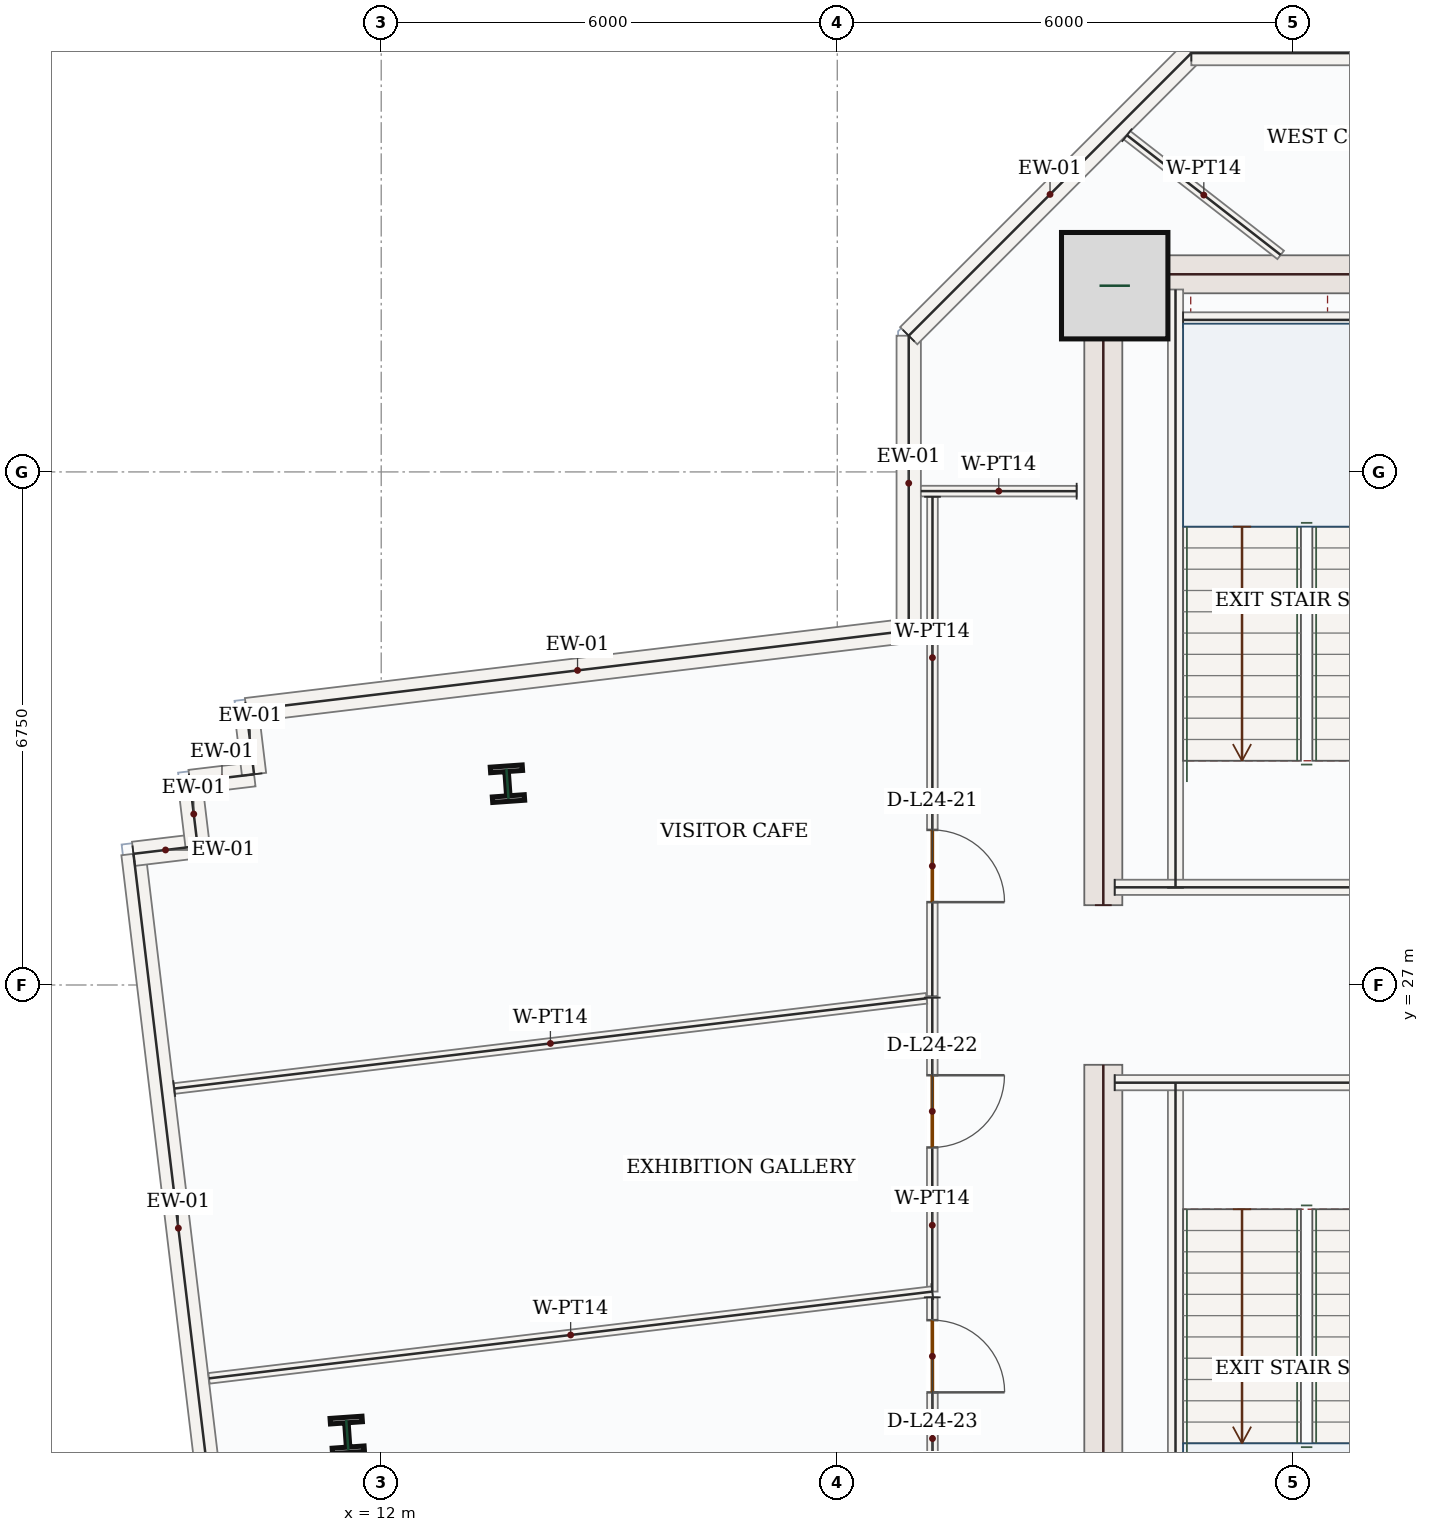
"""IFC4 building model, lengths in metres.
Left out: names, types, materials, properties, quantities, classifications, styles, units other than length and angle.
Written with IfcOpenShell. Run it as: python <this file> out.ifc"""

import sys

from ifc_helpers import new_model, si_unit, direction, frame, frame_2d, origin, origin_2d, place, context, subcontext, project, spatial, rectangle, i_section, extrude, source, transform, mapped, element, fill, save


model = new_model("IFC4")
c1 = context("Model", 3, precision=1e-05, world=origin(), true_north=direction((0.0, 1.0)))
c2 = subcontext(c1, "Body", "Model", "MODEL_VIEW")
j1 = project(units=[si_unit("LENGTHUNIT", "METRE"), si_unit("PLANEANGLEUNIT", "RADIAN")], contexts=[c1])
p1 = place(None, origin())
s1 = spatial("IfcSite", under=j1, at=p1, CompositionType="ELEMENT")
p2 = place(p1, origin())
s2 = spatial("IfcBuilding", under=s1, at=p2, CompositionType="ELEMENT")
p3 = place(p2, frame((0.0, 0.0, 108.9)))
s3 = spatial("IfcBuildingStorey", under=s2, at=p3, CompositionType="ELEMENT", Elevation=108.9)
m1 = source(origin(), c2, "Body", "SweptSolid", [
    extrude(rectangle(XDim=8.55, YDim=0.5, at=frame_2d((4.275, 0.0))), origin(), (0.0, 0.0, 1.0), 3.95),
])
for number, where, z_axis, x_axis in (
    (1, (21.5, 17.4, 0.0), (0.0, 0.0, 1.0), (0.0, 1.0, 0.0)),
    (2, (21.5, 28.05, 0.0), (0.0, 0.0, 1.0), (0.0, 1.0, 0.0)),
):
    element("IfcWall", number, at=place(p3, frame(where, z_axis=z_axis, x_axis=x_axis)), inside=s3, PredefinedType="SHEAR", context=c2, shape_type="MappedRepresentation", body=[
        mapped(m1, transform((0.0, 0.0, 0.0), x_axis=(1.0, 0.0, 0.0), y_axis=(0.0, 1.0, 0.0), z_axis=(0.0, 0.0, 1.0), scale=1.0)),
    ])
m2 = source(origin(), c2, "Body", "SweptSolid", [
    extrude(rectangle(XDim=7.0, YDim=0.5, at=frame_2d((3.5, 0.0))), origin(), (0.0, 0.0, 1.0), 3.95),
])
p4 = place(p3, frame((21.75, 36.35, 0.0), z_axis=(0.0, 0.0, 1.0), x_axis=(1.0, 0.0, 0.0)))
e3 = element("IfcWall", 3, at=p4, inside=s3, PredefinedType="SHEAR", context=c2, shape_type="MappedRepresentation", body=[
    mapped(m2, transform((0.0, 0.0, 0.0), x_axis=(1.0, 0.0, 0.0), y_axis=(0.0, 1.0, 0.0), z_axis=(0.0, 0.0, 1.0), scale=1.0)),
])
m3 = source(origin(), c2, "Body", "SweptSolid", [
    extrude(rectangle(XDim=1.4, YDim=1.4, at=origin_2d()), origin(), (0.0, 0.0, 1.0), 4.2),
])
p5 = place(p3, frame((21.65, 36.2, 0.0), z_axis=(0.0, 0.0, 1.0), x_axis=(1.0, 0.0, 0.0)))
e4 = element("IfcColumn", 4, at=p5, inside=s3, PredefinedType="COLUMN", context=c2, shape_type="MappedRepresentation", body=[
    mapped(m3, transform((0.0, 0.0, 0.0), x_axis=(1.0, 0.0, 0.0), y_axis=(0.0, 1.0, 0.0), z_axis=(0.0, 0.0, 1.0), scale=1.0)),
])
m4 = source(origin(), c2, "Body", "SweptSolid", [
    extrude(i_section(OverallWidth=0.421, OverallDepth=0.465, WebThickness=0.045, FlangeThickness=0.073, FilletRadius=0.018, at=origin_2d()), origin(), (0.0, 0.0, 1.0), 4.2),
])
for number, where, z_axis, x_axis in (
    (5, (13.661, 29.648, 0.0), (0.0, 0.0, 1.0), (0.998, 0.07, 0.0)),
    (6, (11.553, 21.08, 0.0), (0.0, 0.0, 1.0), (0.998, 0.07, 0.0)),
):
    element("IfcColumn", number, at=place(p3, frame(where, z_axis=z_axis, x_axis=x_axis)), inside=s3, PredefinedType="COLUMN", context=c2, shape_type="MappedRepresentation", body=[
        mapped(m4, transform((0.0, 0.0, 0.0), x_axis=(1.0, 0.0, 0.0), y_axis=(0.0, 1.0, 0.0), z_axis=(0.0, 0.0, 1.0), scale=1.0)),
    ])
m5 = source(origin(), c2, "Body", "SweptSolid", [
    extrude(rectangle(XDim=9.92, YDim=0.32, at=frame_2d((4.96, 0.0))), origin(), (0.0, 0.0, 1.0), 3.95),
])
p6 = place(p3, frame((9.922, 18.876, 0.0), z_axis=(0.0, 0.0, 1.0), x_axis=(-0.119092815244, 0.992883125729, 0.0)))
e7 = element("IfcWall", 7, at=p6, inside=s3, PredefinedType="SOLIDWALL", context=c2, shape_type="MappedRepresentation", body=[
    mapped(m5, transform((0.0, 0.0, 0.0), x_axis=(1.0, 0.0, 0.0), y_axis=(0.0, 1.0, 0.0), z_axis=(0.0, 0.0, 1.0), scale=1.0)),
])
m6 = source(origin(), c2, "Body", "SweptSolid", [
    extrude(rectangle(XDim=0.85, YDim=0.32, at=frame_2d((0.425, 0.0))), origin(), (0.0, 0.0, 1.0), 3.95),
])
for number, where, z_axis, x_axis in (
    (8, (8.74, 28.726, 0.0), (0.0, 0.0, 1.0), (0.993, 0.119, 0.0)),
    (9, (9.584, 28.827, 0.0), (0.0, 0.0, 1.0), (-0.119, 0.993, 0.0)),
    (10, (9.483, 29.671, 0.0), (0.0, 0.0, 1.0), (0.993, 0.119, 0.0)),
    (11, (10.327, 29.772, 0.0), (0.0, 0.0, 1.0), (-0.119, 0.993, 0.0)),
):
    element("IfcWall", number, at=place(p3, frame(where, z_axis=z_axis, x_axis=x_axis)), inside=s3, PredefinedType="SOLIDWALL", context=c2, shape_type="MappedRepresentation", body=[
        mapped(m6, transform((0.0, 0.0, 0.0), x_axis=(1.0, 0.0, 0.0), y_axis=(0.0, 1.0, 0.0), z_axis=(0.0, 0.0, 1.0), scale=1.0)),
    ])
m7 = source(origin(), c2, "Body", "SweptSolid", [
    extrude(rectangle(XDim=8.777, YDim=0.32, at=frame_2d((4.388, 0.0))), origin(), (0.0, 0.0, 1.0), 3.95),
])
p7 = place(p3, frame((10.226, 30.616, 0.0), z_axis=(0.0, 0.0, 1.0), x_axis=(0.992883944618, 0.119085987922, 0.0)))
e12 = element("IfcWall", 12, at=p7, inside=s3, PredefinedType="SOLIDWALL", context=c2, shape_type="MappedRepresentation", body=[
    mapped(m7, transform((0.0, 0.0, 0.0), x_axis=(1.0, 0.0, 0.0), y_axis=(0.0, 1.0, 0.0), z_axis=(0.0, 0.0, 1.0), scale=1.0)),
])
m8 = source(origin(), c2, "Body", "SweptSolid", [
    extrude(rectangle(XDim=3.881, YDim=0.32, at=frame_2d((1.94, 0.0))), origin(), (0.0, 0.0, 1.0), 3.95),
])
p8 = place(p3, frame((18.94, 31.661, 0.0), z_axis=(0.0, 0.0, 1.0), x_axis=(0.0, 1.0, 0.0)))
e13 = element("IfcWall", 13, at=p8, inside=s3, PredefinedType="SOLIDWALL", context=c2, shape_type="MappedRepresentation", body=[
    mapped(m8, transform((0.0, 0.0, 0.0), x_axis=(1.0, 0.0, 0.0), y_axis=(0.0, 1.0, 0.0), z_axis=(0.0, 0.0, 1.0), scale=1.0)),
])
m9 = source(origin(), c2, "Body", "SweptSolid", [
    extrude(rectangle(XDim=5.258, YDim=0.32, at=frame_2d((2.629, 0.0))), origin(), (0.0, 0.0, 1.0), 3.95),
])
p9 = place(p3, frame((18.94, 35.542, 0.0), z_axis=(0.0, 0.0, 1.0), x_axis=(0.707106781187, 0.707106781187, 0.0)))
e14 = element("IfcWall", 14, at=p9, inside=s3, PredefinedType="SOLIDWALL", context=c2, shape_type="MappedRepresentation", body=[
    mapped(m9, transform((0.0, 0.0, 0.0), x_axis=(1.0, 0.0, 0.0), y_axis=(0.0, 1.0, 0.0), z_axis=(0.0, 0.0, 1.0), scale=1.0)),
])
m10 = source(origin(), c2, "Body", "SweptSolid", [
    extrude(rectangle(XDim=5.164, YDim=0.32, at=frame_2d((2.582, 0.0))), origin(), (0.0, 0.0, 1.0), 3.95),
])
p10 = place(p3, frame((22.658, 39.26, 0.0), z_axis=(0.0, 0.0, 1.0), x_axis=(1.0, 0.0, 0.0)))
e15 = element("IfcWall", 15, at=p10, inside=s3, PredefinedType="SOLIDWALL", context=c2, shape_type="MappedRepresentation", body=[
    mapped(m10, transform((0.0, 0.0, 0.0), x_axis=(1.0, 0.0, 0.0), y_axis=(0.0, 1.0, 0.0), z_axis=(0.0, 0.0, 1.0), scale=1.0)),
])
m11 = source(origin(), c2, "Body", "SweptSolid", [
    extrude(rectangle(XDim=7.87, YDim=0.2, at=frame_2d((3.935, 0.0))), origin(), (0.0, 0.0, 1.0), 3.95),
])
for number, where, z_axis, x_axis in (
    (16, (22.45, 17.85, 0.0), (0.0, 0.0, 1.0), (0.0, 1.0, 0.0)),
    (17, (22.45, 28.28, 0.0), (0.0, 0.0, 1.0), (0.0, 1.0, 0.0)),
):
    element("IfcWall", number, at=place(p3, frame(where, z_axis=z_axis, x_axis=x_axis)), inside=s3, PredefinedType="SOLIDWALL", context=c2, shape_type="MappedRepresentation", body=[
        mapped(m11, transform((0.0, 0.0, 0.0), x_axis=(1.0, 0.0, 0.0), y_axis=(0.0, 1.0, 0.0), z_axis=(0.0, 0.0, 1.0), scale=1.0)),
    ])
m12 = source(origin(), c2, "Body", "SweptSolid", [
    extrude(rectangle(XDim=4.25, YDim=0.2, at=frame_2d((2.125, 0.0))), origin(), (0.0, 0.0, 1.0), 3.95),
])
for number, where, z_axis, x_axis in (
    (18, (21.65, 25.715, 0.0), (0.0, 0.0, 1.0), (1.0, 0.0, 0.0)),
    (19, (21.65, 28.285, 0.0), (0.0, 0.0, 1.0), (1.0, 0.0, 0.0)),
):
    element("IfcWall", number, at=place(p3, frame(where, z_axis=z_axis, x_axis=x_axis)), inside=s3, PredefinedType="SOLIDWALL", context=c2, shape_type="MappedRepresentation", body=[
        mapped(m12, transform((0.0, 0.0, 0.0), x_axis=(1.0, 0.0, 0.0), y_axis=(0.0, 1.0, 0.0), z_axis=(0.0, 0.0, 1.0), scale=1.0)),
    ])
m13 = source(origin(), c2, "Body", "SweptSolid", [
    extrude(rectangle(XDim=3.25, YDim=0.2, at=frame_2d((1.625, 0.0))), origin(), (0.0, 0.0, 1.0), 3.95),
])
p11 = place(p3, frame((22.55, 35.75, 0.0), z_axis=(0.0, 0.0, 1.0), x_axis=(1.0, 0.0, 0.0)))
e20 = element("IfcWall", 20, at=p11, inside=s3, PredefinedType="SOLIDWALL", context=c2, shape_type="MappedRepresentation", body=[
    mapped(m13, transform((0.0, 0.0, 0.0), x_axis=(1.0, 0.0, 0.0), y_axis=(0.0, 1.0, 0.0), z_axis=(0.0, 0.0, 1.0), scale=1.0)),
])
p12 = place(p3, frame((19.25, 26.834, 0.0), z_axis=(0.0, 0.0, 1.0), x_axis=(0.0, -1.0, 0.0)))
e21 = element("IfcWall", 21, at=p12, inside=s3, PredefinedType="PARTITIONING", context=c2, shape_type="SweptSolid", body=[
    extrude(rectangle(XDim=3.868, YDim=0.14, at=frame_2d((1.934, 0.0))), origin(), (0.0, 0.0, 1.0), 3.95),
])
p13 = place(p12, frame((1.021, 0.0, 0.0)))
e22 = element("IfcOpeningElement", 22, at=p13, cuts=e21, PredefinedType="OPENING", context=c2, shape_type="SweptSolid", body=[
    extrude(rectangle(XDim=0.95, YDim=2.15, at=frame_2d((0.475, 1.075))), frame((0.0, 0.08, 0.0), z_axis=(0.0, -1.0, 0.0), x_axis=(1.0, 0.0, 0.0)), (0.0, 0.0, 1.0), 0.16),
])
m14 = source(origin(), c2, "Body", "SweptSolid", [
    extrude(rectangle(XDim=9.584, YDim=0.14, at=frame_2d((4.792, 0.0))), origin(), (0.0, 0.0, 1.0), 3.95),
])
p14 = place(p3, frame((19.25, 22.966, 0.0), z_axis=(0.0, 0.0, 1.0), x_axis=(-0.992883225705, -0.119091981737, 0.0)))
e23 = element("IfcWall", 23, at=p14, inside=s3, PredefinedType="PARTITIONING", context=c2, shape_type="MappedRepresentation", body=[
    mapped(m14, transform((0.0, 0.0, 0.0), x_axis=(1.0, 0.0, 0.0), y_axis=(0.0, 1.0, 0.0), z_axis=(0.0, 0.0, 1.0), scale=1.0)),
])
m15 = source(origin(), c2, "Body", "SweptSolid", [
    extrude(rectangle(XDim=9.969, YDim=0.14, at=frame_2d((4.984, 0.0))), origin(), (0.0, 0.0, 1.0), 3.95),
])
p15 = place(p3, frame((9.277, 25.638, 0.0), z_axis=(0.0, 0.0, 1.0), x_axis=(0.992882747367, 0.119095969623, 0.0)))
e24 = element("IfcWall", 24, at=p15, inside=s3, PredefinedType="PARTITIONING", context=c2, shape_type="MappedRepresentation", body=[
    mapped(m15, transform((0.0, 0.0, 0.0), x_axis=(1.0, 0.0, 0.0), y_axis=(0.0, 1.0, 0.0), z_axis=(0.0, 0.0, 1.0), scale=1.0)),
])
m16 = source(origin(), c2, "Body", "SweptSolid", [
    extrude(rectangle(XDim=2.049, YDim=0.14, at=frame_2d((1.025, 0.0))), origin(), (0.0, 0.0, 1.0), 3.95),
])
p16 = place(p3, frame((21.149, 33.497, 0.0), z_axis=(0.0, 0.0, 1.0), x_axis=(-0.999999822593, 0.000595663464, 0.0)))
e25 = element("IfcWall", 25, at=p16, inside=s3, PredefinedType="PARTITIONING", context=c2, shape_type="MappedRepresentation", body=[
    mapped(m16, transform((0.0, 0.0, 0.0), x_axis=(1.0, 0.0, 0.0), y_axis=(0.0, 1.0, 0.0), z_axis=(0.0, 0.0, 1.0), scale=1.0)),
])
p17 = place(p3, frame((19.253, 33.423, 0.0), z_axis=(0.0, 0.0, 1.0), x_axis=(-0.000408845905, -0.999999916423, 0.0)))
e26 = element("IfcWall", 26, at=p17, inside=s3, PredefinedType="PARTITIONING", context=c2, shape_type="SweptSolid", body=[
    extrude(rectangle(XDim=6.569, YDim=0.14, at=frame_2d((3.284, 0.0))), origin(), (0.0, 0.0, 1.0), 3.95),
])
p18 = place(p17, frame((4.382, 0.0, 0.0)))
e27 = element("IfcOpeningElement", 27, at=p18, cuts=e26, PredefinedType="OPENING", context=c2, shape_type="SweptSolid", body=[
    extrude(rectangle(XDim=0.95, YDim=2.15, at=frame_2d((0.475, 1.075))), frame((0.0, 0.08, 0.0), z_axis=(0.0, -1.0, 0.0), x_axis=(1.0, 0.0, 0.0)), (0.0, 0.0, 1.0), 0.16),
])
m17 = source(origin(), c2, "Body", "SweptSolid", [
    extrude(rectangle(XDim=2.563, YDim=0.14, at=frame_2d((1.282, 0.0))), origin(), (0.0, 0.0, 1.0), 3.95),
])
p19 = place(p3, frame((21.811, 38.18, 0.0), z_axis=(0.0, 0.0, 1.0), x_axis=(0.789034129839, -0.614349364734, 0.0)))
e28 = element("IfcWall", 28, at=p19, inside=s3, PredefinedType="PARTITIONING", context=c2, shape_type="MappedRepresentation", body=[
    mapped(m17, transform((0.0, 0.0, 0.0), x_axis=(1.0, 0.0, 0.0), y_axis=(0.0, 1.0, 0.0), z_axis=(0.0, 0.0, 1.0), scale=1.0)),
])
p20 = place(p3, frame((19.25, 22.891, 0.0), z_axis=(0.0, 0.0, 1.0), x_axis=(0.001476168784, -0.999998910462, 0.0)))
e29 = element("IfcWall", 29, at=p20, inside=s3, PredefinedType="PARTITIONING", context=c2, shape_type="SweptSolid", body=[
    extrude(rectangle(XDim=2.315, YDim=0.14, at=frame_2d((1.158, 0.0))), origin(), (0.0, 0.0, 1.0), 3.95),
])
p21 = place(p20, frame((0.3, 0.0, 0.0)))
e30 = element("IfcOpeningElement", 30, at=p21, cuts=e29, PredefinedType="OPENING", context=c2, shape_type="SweptSolid", body=[
    extrude(rectangle(XDim=0.95, YDim=2.15, at=frame_2d((0.475, 1.075))), frame((0.0, 0.08, 0.0), z_axis=(0.0, -1.0, 0.0), x_axis=(1.0, 0.0, 0.0)), (0.0, 0.0, 1.0), 0.16),
])
m18 = source(origin(), c2, "Body", "SweptSolid", [
    extrude(rectangle(XDim=0.95, YDim=2.15, at=frame_2d((0.475, 1.075))), frame((0.0, 0.025, 0.0), z_axis=(0.0, -1.0, 0.0), x_axis=(1.0, 0.0, 0.0)), (0.0, 0.0, 1.0), 0.05),
])
p22 = place(p18, origin())
e31 = element("IfcDoor", 31, at=p22, inside=s3, OperationType="SINGLE_SWING_RIGHT", PredefinedType="DOOR", context=c2, shape_type="MappedRepresentation", body=[
    mapped(m18, transform((0.0, 0.0, 0.0), x_axis=(1.0, 0.0, 0.0), y_axis=(0.0, 1.0, 0.0), z_axis=(0.0, 0.0, 1.0), scale=1.0)),
])
fill(e27, e31)
p23 = place(p13, origin())
e32 = element("IfcDoor", 32, at=p23, inside=s3, OperationType="SINGLE_SWING_LEFT", PredefinedType="DOOR", context=c2, shape_type="MappedRepresentation", body=[
    mapped(m18, transform((0.0, 0.0, 0.0), x_axis=(1.0, 0.0, 0.0), y_axis=(0.0, 1.0, 0.0), z_axis=(0.0, 0.0, 1.0), scale=1.0)),
])
fill(e22, e32)
p24 = place(p21, origin())
e33 = element("IfcDoor", 33, at=p24, inside=s3, OperationType="SINGLE_SWING_RIGHT", PredefinedType="DOOR", context=c2, shape_type="MappedRepresentation", body=[
    mapped(m18, transform((0.0, 0.0, 0.0), x_axis=(1.0, 0.0, 0.0), y_axis=(0.0, 1.0, 0.0), z_axis=(0.0, 0.0, 1.0), scale=1.0)),
])
fill(e30, e33)
save(model, sys.argv[1])
